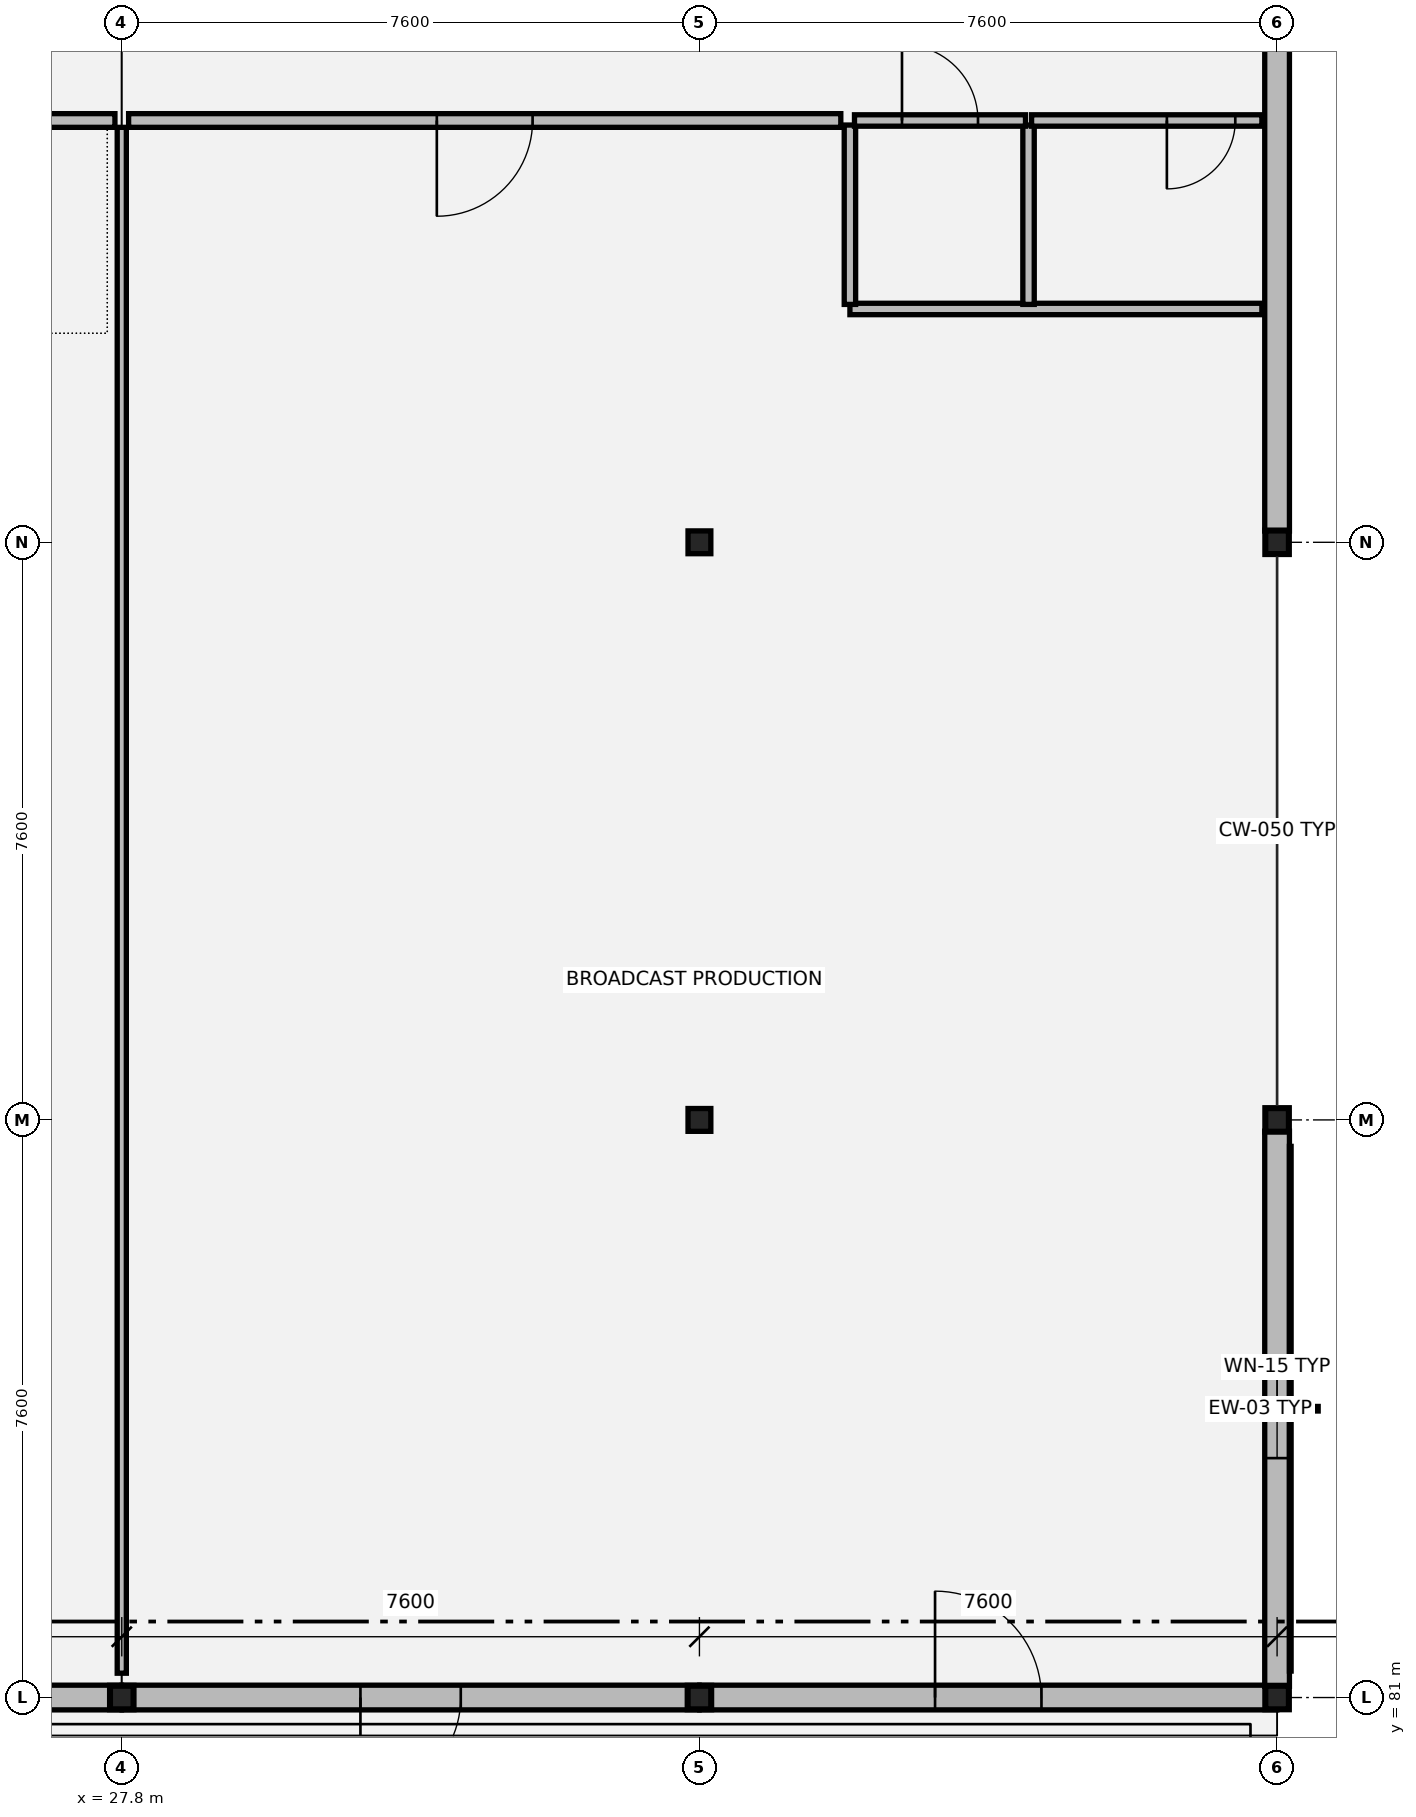
"""IFC4 building model, lengths in metres.
Left out: names, types, materials, properties, quantities, classifications, styles, units other than length and angle.
Written with IfcOpenShell. Run it as: python <this file> out.ifc"""

import sys

from ifc_helpers import new_model, si_unit, direction, frame, frame_2d, origin, origin_2d, place, context, subcontext, project, spatial, rectangle, i_section, extrude, element, fill, save


model = new_model("IFC4")
c1 = context("Model", 3, precision=1e-05, world=origin(), true_north=direction((0.0, 1.0)))
c2 = subcontext(c1, "Body", "Model", "MODEL_VIEW")
j1 = project(units=[si_unit("LENGTHUNIT", "METRE"), si_unit("PLANEANGLEUNIT", "RADIAN")], contexts=[c1])
p1 = place(None, origin())
s1 = spatial("IfcSite", under=j1, at=p1, CompositionType="ELEMENT")
p2 = place(p1, origin())
s2 = spatial("IfcBuilding", under=s1, at=p2, CompositionType="ELEMENT")
p3 = place(p2, frame((0.0, 0.0, 13.26)))
s3 = spatial("IfcBuildingStorey", under=s2, at=p3, CompositionType="ELEMENT", Elevation=13.26)
for number, where, z_axis, x_axis in (
    (1, (27.8, 81.0, 0.0), (0.0, 0.0, 1.0), (1.0, 0.0, 0.0)),
    (2, (35.4, 81.0, 0.0), (0.0, 0.0, 1.0), (1.0, 0.0, 0.0)),
    (3, (35.4, 88.6, 0.0), (0.0, 0.0, 1.0), (1.0, 0.0, 0.0)),
    (4, (35.4, 96.2, 0.0), (0.0, 0.0, 1.0), (1.0, 0.0, 0.0)),
    (5, (43.0, 81.0, 0.0), (0.0, 0.0, 1.0), (1.0, 0.0, 0.0)),
    (6, (43.0, 88.6, 0.0), (0.0, 0.0, 1.0), (1.0, 0.0, 0.0)),
    (7, (43.0, 96.2, 0.0), (0.0, 0.0, 1.0), (1.0, 0.0, 0.0)),
):
    element("IfcColumn", number, at=place(p3, frame(where, z_axis=z_axis, x_axis=x_axis)), inside=s3, PredefinedType="COLUMN", context=c2, shape_type="SweptSolid", body=[
        extrude(i_section(OverallWidth=0.3, OverallDepth=0.3, WebThickness=0.011, FlangeThickness=0.019, at=origin_2d()), origin(), (0.0, 0.0, 1.0), 3.87),
    ])
p4 = place(p3, frame((20.204, 81.0, 0.0), z_axis=(0.0, 0.0, 1.0), x_axis=(1.0, 0.0, 0.0)))
e8 = element("IfcWall", 8, at=p4, inside=s3, PredefinedType="SOLIDWALL", context=c2, shape_type="SweptSolid", body=[
    extrude(rectangle(XDim=7.592, YDim=0.325, at=frame_2d((3.796, 0.0))), origin(), (0.0, 0.0, 1.0), 3.32),
])
p5 = place(p4, frame((3.171, 0.0, 0.0)))
e9 = element("IfcOpeningElement", 9, at=p5, cuts=e8, PredefinedType="OPENING", context=c2, shape_type="SweptSolid", body=[
    extrude(rectangle(XDim=1.25, YDim=2.2, at=frame_2d((0.625, 1.1))), frame((0.0, 0.172, 0.0), z_axis=(0.0, -1.0, 0.0), x_axis=(1.0, 0.0, 0.0)), (0.0, 0.0, 1.0), 0.345),
])
p6 = place(p3, frame((27.804, 81.0, 0.0), z_axis=(0.0, 0.0, 1.0), x_axis=(1.0, 0.0, 0.0)))
e10 = element("IfcWall", 10, at=p6, inside=s3, PredefinedType="SOLIDWALL", context=c2, shape_type="SweptSolid", body=[
    extrude(rectangle(XDim=7.592, YDim=0.325, at=frame_2d((3.796, 0.0))), origin(), (0.0, 0.0, 1.0), 3.32),
])
p7 = place(p6, frame((3.136, 0.0, 0.0)))
e11 = element("IfcOpeningElement", 11, at=p7, cuts=e10, PredefinedType="OPENING", context=c2, shape_type="SweptSolid", body=[
    extrude(rectangle(XDim=1.32, YDim=2.22, at=frame_2d((0.66, 1.11))), frame((0.0, 0.172, 0.0), z_axis=(0.0, -1.0, 0.0), x_axis=(1.0, 0.0, 0.0)), (0.0, 0.0, 1.0), 0.345),
])
p8 = place(p3, frame((35.404, 81.0, 0.0), z_axis=(0.0, 0.0, 1.0), x_axis=(1.0, 0.0, 0.0)))
e12 = element("IfcWall", 12, at=p8, inside=s3, PredefinedType="SOLIDWALL", context=c2, shape_type="SweptSolid", body=[
    extrude(rectangle(XDim=7.592, YDim=0.325, at=frame_2d((3.796, 0.0))), origin(), (0.0, 0.0, 1.0), 3.32),
])
p9 = place(p8, frame((3.096, 0.0, 0.0)))
e13 = element("IfcOpeningElement", 13, at=p9, cuts=e12, PredefinedType="OPENING", context=c2, shape_type="SweptSolid", body=[
    extrude(rectangle(XDim=1.4, YDim=2.25, at=frame_2d((0.7, 1.125))), frame((0.0, 0.172, 0.0), z_axis=(0.0, -1.0, 0.0), x_axis=(1.0, 0.0, 0.0)), (0.0, 0.0, 1.0), 0.345),
])
p10 = place(p3, frame((43.0, 81.148, 0.0), z_axis=(0.0, 0.0, 1.0), x_axis=(0.0, 1.0, 0.0)))
e14 = element("IfcWall", 14, at=p10, inside=s3, PredefinedType="SOLIDWALL", context=c2, shape_type="SweptSolid", body=[
    extrude(rectangle(XDim=7.304, YDim=0.325, at=frame_2d((3.652, 0.0))), origin(), (0.0, 0.0, 1.0), 3.48),
])
p11 = place(p10, frame((3.002, 0.0, 0.8)))
e15 = element("IfcOpeningElement", 15, at=p11, cuts=e14, PredefinedType="OPENING", context=c2, shape_type="SweptSolid", body=[
    extrude(rectangle(XDim=1.3, YDim=2.12, at=frame_2d((0.65, 1.06))), frame((0.0, 0.172, 0.0), z_axis=(0.0, -1.0, 0.0), x_axis=(1.0, 0.0, 0.0)), (0.0, 0.0, 1.0), 0.345),
])
p12 = place(p3, frame((43.0, 96.348, 0.0), z_axis=(0.0, 0.0, 1.0), x_axis=(0.0, 1.0, 0.0)))
e16 = element("IfcWall", 16, at=p12, inside=s3, PredefinedType="SOLIDWALL", context=c2, shape_type="SweptSolid", body=[
    extrude(rectangle(XDim=7.304, YDim=0.325, at=frame_2d((3.652, 0.0))), origin(), (0.0, 0.0, 1.0), 3.48),
])
p13 = place(p3, frame((37.38, 99.27, 0.0), z_axis=(0.0, 0.0, 1.0), x_axis=(1.0, 0.0, 0.0)))
e17 = element("IfcWall", 17, at=p13, inside=s3, PredefinedType="PARTITIONING", context=c2, shape_type="SweptSolid", body=[
    extrude(rectangle(XDim=5.42, YDim=0.15, at=frame_2d((2.71, 0.0))), origin(), (0.0, 0.0, 1.0), 3.18),
])
for number, where, z_axis, x_axis in (
    (18, (37.38, 99.33, 0.0), (0.0, 0.0, 1.0), (0.0, 1.0, 0.0)),
    (19, (39.73, 99.33, 0.0), (0.0, 0.0, 1.0), (0.0, 1.0, 0.0)),
):
    element("IfcWall", number, at=place(p3, frame(where, z_axis=z_axis, x_axis=x_axis)), inside=s3, PredefinedType="PARTITIONING", context=c2, shape_type="SweptSolid", body=[
        extrude(rectangle(XDim=2.36, YDim=0.15, at=frame_2d((1.18, 0.0))), origin(), (0.0, 0.0, 1.0), 3.18),
    ])
p14 = place(p3, frame((37.44, 101.75, 0.0), z_axis=(0.0, 0.0, 1.0), x_axis=(1.0, 0.0, 0.0)))
e20 = element("IfcWall", 20, at=p14, inside=s3, PredefinedType="PARTITIONING", context=c2, shape_type="SweptSolid", body=[
    extrude(rectangle(XDim=2.25, YDim=0.15, at=frame_2d((1.125, 0.0))), origin(), (0.0, 0.0, 1.0), 3.18),
])
p15 = place(p14, frame((0.625, 0.0, 0.0)))
e21 = element("IfcOpeningElement", 21, at=p15, cuts=e20, PredefinedType="OPENING", context=c2, shape_type="SweptSolid", body=[
    extrude(rectangle(XDim=1.0, YDim=2.15, at=frame_2d((0.5, 1.075))), frame((0.0, 0.085, 0.0), z_axis=(0.0, -1.0, 0.0), x_axis=(1.0, 0.0, 0.0)), (0.0, 0.0, 1.0), 0.17),
])
p16 = place(p3, frame((39.77, 101.75, 0.0), z_axis=(0.0, 0.0, 1.0), x_axis=(1.0, 0.0, 0.0)))
e22 = element("IfcWall", 22, at=p16, inside=s3, PredefinedType="PARTITIONING", context=c2, shape_type="SweptSolid", body=[
    extrude(rectangle(XDim=3.03, YDim=0.15, at=frame_2d((1.515, 0.0))), origin(), (0.0, 0.0, 1.0), 3.18),
])
p17 = place(p16, frame((1.78, 0.0, 0.0)))
e23 = element("IfcOpeningElement", 23, at=p17, cuts=e22, PredefinedType="OPENING", context=c2, shape_type="SweptSolid", body=[
    extrude(rectangle(XDim=0.9, YDim=2.15, at=frame_2d((0.45, 1.075))), frame((0.0, 0.085, 0.0), z_axis=(0.0, -1.0, 0.0), x_axis=(1.0, 0.0, 0.0)), (0.0, 0.0, 1.0), 0.17),
])
p18 = place(p3, frame((20.29, 101.75, 0.0), z_axis=(0.0, 0.0, 1.0), x_axis=(1.0, 0.0, 0.0)))
e24 = element("IfcWall", 24, at=p18, inside=s3, PredefinedType="PARTITIONING", context=c2, shape_type="SweptSolid", body=[
    extrude(rectangle(XDim=7.42, YDim=0.18, at=frame_2d((3.71, 0.0))), origin(), (0.0, 0.0, 1.0), 3.18),
])
p19 = place(p18, frame((3.01, 0.0, 0.0)))
e25 = element("IfcOpeningElement", 25, at=p19, cuts=e24, PredefinedType="OPENING", context=c2, shape_type="SweptSolid", body=[
    extrude(rectangle(XDim=1.4, YDim=2.22, at=frame_2d((0.7, 1.11))), frame((0.0, 0.1, 0.0), z_axis=(0.0, -1.0, 0.0), x_axis=(1.0, 0.0, 0.0)), (0.0, 0.0, 1.0), 0.2),
])
p20 = place(p3, frame((27.89, 101.75, 0.0), z_axis=(0.0, 0.0, 1.0), x_axis=(1.0, 0.0, 0.0)))
e26 = element("IfcWall", 26, at=p20, inside=s3, PredefinedType="PARTITIONING", context=c2, shape_type="SweptSolid", body=[
    extrude(rectangle(XDim=9.37, YDim=0.18, at=frame_2d((4.685, 0.0))), origin(), (0.0, 0.0, 1.0), 3.18),
])
p21 = place(p20, frame((4.055, 0.0, 0.0)))
e27 = element("IfcOpeningElement", 27, at=p21, cuts=e26, PredefinedType="OPENING", context=c2, shape_type="SweptSolid", body=[
    extrude(rectangle(XDim=1.26, YDim=2.2, at=frame_2d((0.63, 1.1))), frame((0.0, 0.1, 0.0), z_axis=(0.0, -1.0, 0.0), x_axis=(1.0, 0.0, 0.0)), (0.0, 0.0, 1.0), 0.2),
])
p22 = place(p3, frame((27.8, 81.32, 0.0), z_axis=(0.0, 0.0, 1.0), x_axis=(0.0, 1.0, 0.0)))
e28 = element("IfcWall", 28, at=p22, inside=s3, PredefinedType="PARTITIONING", context=c2, shape_type="SweptSolid", body=[
    extrude(rectangle(XDim=20.34, YDim=0.12, at=frame_2d((10.17, 0.0))), origin(), (0.0, 0.0, 1.0), 3.18),
])
p23 = place(p7, origin())
e29 = element("IfcDoor", 29, at=p23, inside=s3, OperationType="SINGLE_SWING_RIGHT", PredefinedType="DOOR", context=c2, shape_type="SweptSolid", body=[
    extrude(rectangle(XDim=1.32, YDim=2.22, at=frame_2d((0.66, 1.11))), frame((0.0, 0.025, 0.0), z_axis=(0.0, -1.0, 0.0), x_axis=(1.0, 0.0, 0.0)), (0.0, 0.0, 1.0), 0.05),
])
fill(e11, e29)
p24 = place(p9, origin())
e30 = element("IfcDoor", 30, at=p24, inside=s3, OperationType="SINGLE_SWING_LEFT", PredefinedType="DOOR", context=c2, shape_type="SweptSolid", body=[
    extrude(rectangle(XDim=1.4, YDim=2.25, at=frame_2d((0.7, 1.125))), frame((0.0, 0.025, 0.0), z_axis=(0.0, -1.0, 0.0), x_axis=(1.0, 0.0, 0.0)), (0.0, 0.0, 1.0), 0.05),
])
fill(e13, e30)
p25 = place(p11, origin())
e31 = element("IfcWindow", 31, at=p25, inside=s3, PartitioningType="SINGLE_PANEL", PredefinedType="WINDOW", context=c2, shape_type="SweptSolid", body=[
    extrude(rectangle(XDim=1.3, YDim=2.12, at=frame_2d((0.65, 1.06))), frame((0.0, 0.03, 0.0), z_axis=(0.0, -1.0, 0.0), x_axis=(1.0, 0.0, 0.0)), (0.0, 0.0, 1.0), 0.06),
])
fill(e15, e31)
p26 = place(p15, origin())
e32 = element("IfcDoor", 32, at=p26, inside=s3, OperationType="SINGLE_SWING_LEFT", PredefinedType="DOOR", context=c2, shape_type="SweptSolid", body=[
    extrude(rectangle(XDim=1.0, YDim=2.15, at=frame_2d((0.5, 1.075))), frame((0.0, 0.025, 0.0), z_axis=(0.0, -1.0, 0.0), x_axis=(1.0, 0.0, 0.0)), (0.0, 0.0, 1.0), 0.05),
])
fill(e21, e32)
p27 = place(p17, origin())
e33 = element("IfcDoor", 33, at=p27, inside=s3, OperationType="SINGLE_SWING_RIGHT", PredefinedType="DOOR", context=c2, shape_type="SweptSolid", body=[
    extrude(rectangle(XDim=0.9, YDim=2.15, at=frame_2d((0.45, 1.075))), frame((0.0, 0.025, 0.0), z_axis=(0.0, -1.0, 0.0), x_axis=(1.0, 0.0, 0.0)), (0.0, 0.0, 1.0), 0.05),
])
fill(e23, e33)
p28 = place(p21, origin())
e34 = element("IfcDoor", 34, at=p28, inside=s3, OperationType="SINGLE_SWING_RIGHT", PredefinedType="DOOR", context=c2, shape_type="SweptSolid", body=[
    extrude(rectangle(XDim=1.26, YDim=2.2, at=frame_2d((0.63, 1.1))), frame((0.0, 0.025, 0.0), z_axis=(0.0, -1.0, 0.0), x_axis=(1.0, 0.0, 0.0)), (0.0, 0.0, 1.0), 0.05),
])
fill(e27, e34)
save(model, sys.argv[1])
